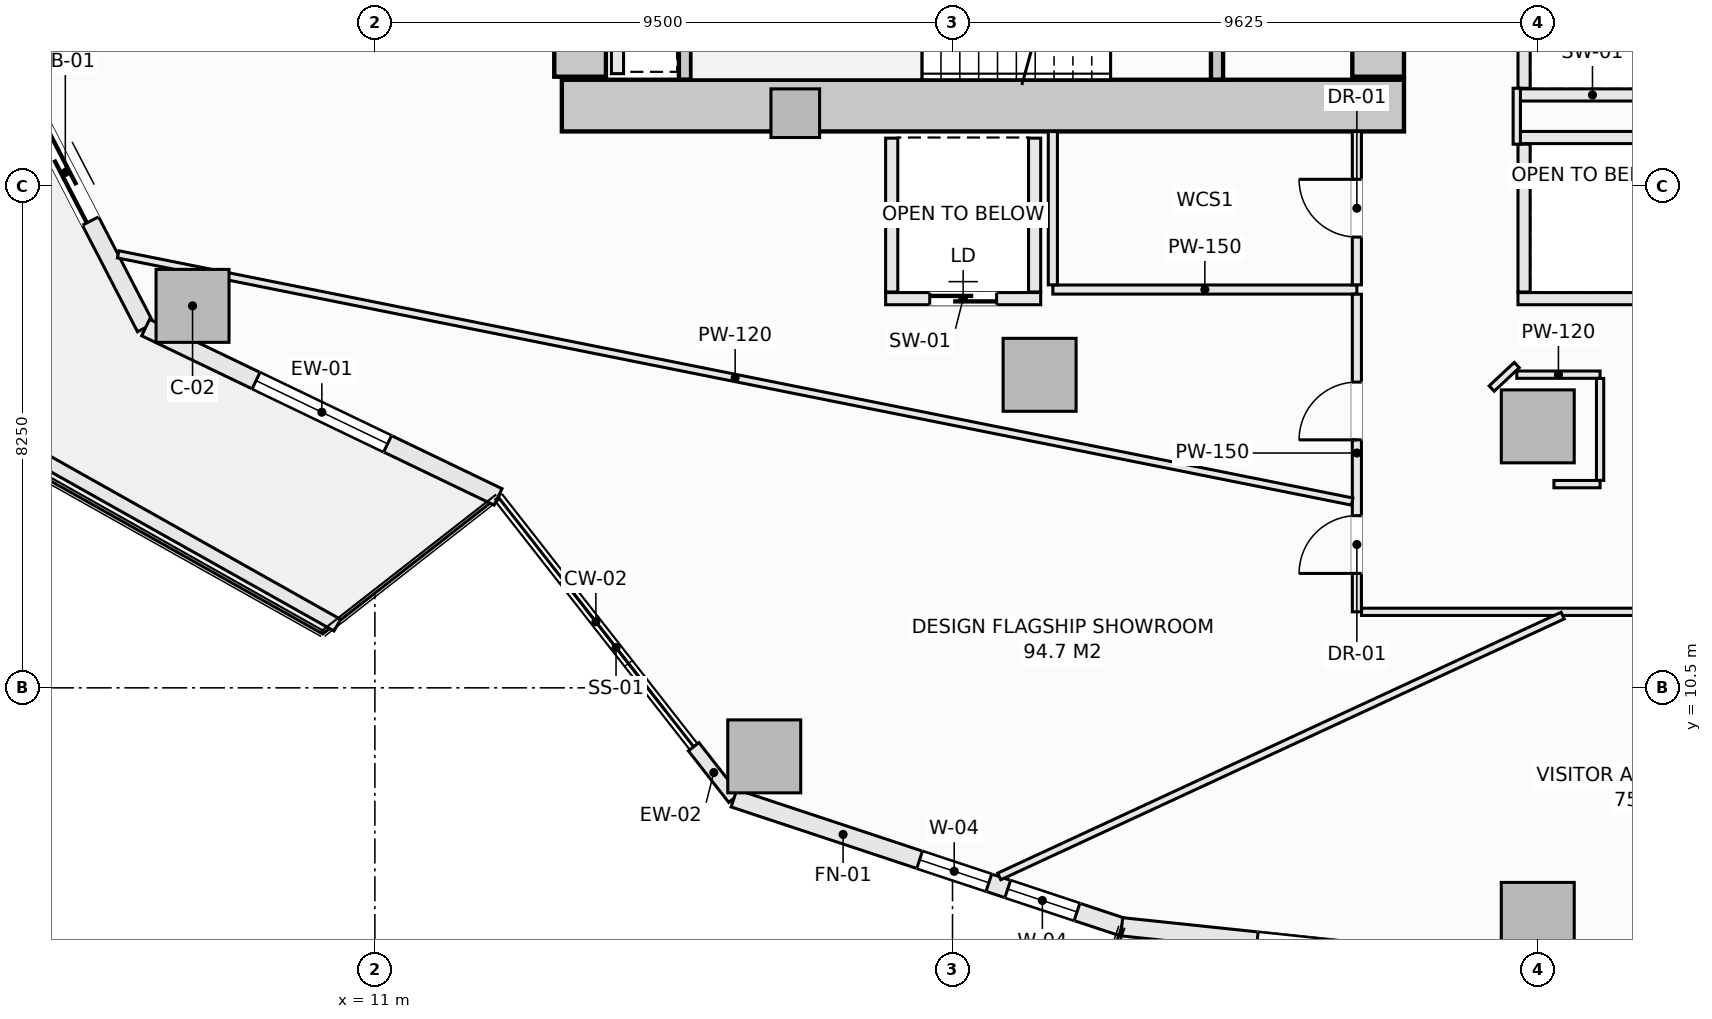
"""IFC4 building model, lengths in metres.
Left out: names, types, materials, properties, quantities, classifications, styles, units other than length and angle.
Written with IfcOpenShell. Run it as: python <this file> out.ifc"""

import sys

from ifc_helpers import new_model, si_unit, direction, frame, frame_2d, origin, origin_2d, place, context, subcontext, project, spatial, rectangle, extrude, element, fill, save


model = new_model("IFC4")
c1 = context("Model", 3, precision=1e-05, world=origin(), true_north=direction((0.0, 1.0)))
c2 = subcontext(c1, "Body", "Model", "MODEL_VIEW")
j1 = project(units=[si_unit("LENGTHUNIT", "METRE"), si_unit("PLANEANGLEUNIT", "RADIAN")], contexts=[c1])
p1 = place(None, origin())
s1 = spatial("IfcSite", under=j1, at=p1, CompositionType="ELEMENT")
p2 = place(p1, origin())
s2 = spatial("IfcBuilding", under=s1, at=p2, CompositionType="ELEMENT")
p3 = place(p2, frame((0.0, 0.0, 61.15)))
s3 = spatial("IfcBuildingStorey", under=s2, at=p3, CompositionType="ELEMENT", Elevation=61.15)
p4 = place(p3, frame((14.075, 20.075, -0.28), z_axis=(0.0, 0.0, 1.0), x_axis=(1.0, 0.0, 0.0)))
e1 = element("IfcWall", 1, at=p4, inside=s3, PredefinedType="SHEAR", context=c2, shape_type="SweptSolid", body=[
    extrude(rectangle(XDim=13.85, YDim=0.85, at=frame_2d((6.925, 0.0))), origin(), (0.0, 0.0, 1.0), 3.85),
])
p5 = place(p3, frame((14.375, 20.55, -0.28), z_axis=(0.0, 0.0, 1.0), x_axis=(0.0, 1.0, 0.0)))
e2 = element("IfcWall", 2, at=p5, inside=s3, PredefinedType="SHEAR", context=c2, shape_type="SweptSolid", body=[
    extrude(rectangle(XDim=12.9, YDim=0.85, at=frame_2d((6.45, 0.0))), origin(), (0.0, 0.0, 1.0), 3.85),
])
p6 = place(p3, frame((27.5, 20.55, -0.28), z_axis=(0.0, 0.0, 1.0), x_axis=(0.0, 1.0, 0.0)))
e3 = element("IfcWall", 3, at=p6, inside=s3, PredefinedType="SHEAR", context=c2, shape_type="SweptSolid", body=[
    extrude(rectangle(XDim=1.5, YDim=0.85, at=frame_2d((0.75, 0.0))), origin(), (0.0, 0.0, 1.0), 3.85),
])
for number, where, z_axis, x_axis in (
    (4, (8.001, 16.781, -0.28), (0.0, 0.0, 1.0), (1.0, 0.0, 0.0)),
    (5, (17.404, 9.373, -0.28), (0.0, 0.0, 1.0), (1.0, 0.0, 0.0)),
    (6, (30.125, 6.7, -0.28), (0.0, 0.0, 1.0), (1.0, 0.0, 0.0)),
    (7, (21.932, 15.648, -0.28), (0.0, 0.0, 1.0), (1.0, 0.0, 0.0)),
    (8, (30.125, 14.8, -0.28), (0.0, 0.0, 1.0), (1.0, 0.0, 0.0)),
):
    element("IfcColumn", number, at=place(p3, frame(where, z_axis=z_axis, x_axis=x_axis)), inside=s3, PredefinedType="COLUMN", context=c2, shape_type="SweptSolid", body=[
        extrude(rectangle(XDim=1.2, YDim=1.2, at=origin_2d()), origin(), (0.0, 0.0, 1.0), 3.85),
    ])
p7 = place(p3, frame((17.914, 19.95, -0.28), z_axis=(0.0, 0.0, 1.0), x_axis=(1.0, 0.0, 0.0)))
e9 = element("IfcColumn", 9, at=p7, inside=s3, PredefinedType="PILASTER", context=c2, shape_type="SweptSolid", body=[
    extrude(rectangle(XDim=0.8, YDim=0.8, at=origin_2d()), origin(), (0.0, 0.0, 1.0), 3.85),
])
p8 = place(p3, frame((4.588, 21.526, 0.0), z_axis=(0.0, 0.0, 1.0), x_axis=(0.459800981414, -0.888021991558, 0.0)))
e10 = element("IfcWall", 10, at=p8, inside=s3, PredefinedType="SOLIDWALL", context=c2, shape_type="SweptSolid", body=[
    extrude(rectangle(XDim=5.744, YDim=0.3, at=frame_2d((2.872, 0.0))), origin(), (0.0, 0.0, 1.0), 3.093),
])
p9 = place(p8, frame((1.972, 0.0, 0.0)))
e11 = element("IfcOpeningElement", 11, at=p9, cuts=e10, PredefinedType="OPENING", context=c2, shape_type="SweptSolid", body=[
    extrude(rectangle(XDim=1.8, YDim=2.25, at=frame_2d((0.9, 1.125))), frame((0.0, 0.16, 0.0), z_axis=(0.0, -1.0, 0.0), x_axis=(1.0, 0.0, 0.0)), (0.0, 0.0, 1.0), 0.32),
])
p10 = place(p3, frame((7.229, 16.425, 0.0), z_axis=(0.0, 0.0, 1.0), x_axis=(0.901354747727, -0.433081538224, 0.0)))
e12 = element("IfcWall", 12, at=p10, inside=s3, PredefinedType="SOLIDWALL", context=c2, shape_type="SweptSolid", body=[
    extrude(rectangle(XDim=6.431, YDim=0.3, at=frame_2d((3.215, 0.0))), origin(), (0.0, 0.0, 1.0), 3.093),
])
p11 = place(p10, frame((2.015, 0.0, 0.85)))
e13 = element("IfcOpeningElement", 13, at=p11, cuts=e12, PredefinedType="OPENING", context=c2, shape_type="SweptSolid", body=[
    extrude(rectangle(XDim=2.4, YDim=1.9, at=frame_2d((1.2, 0.95))), frame((0.0, 0.16, 0.0), z_axis=(0.0, -1.0, 0.0), x_axis=(1.0, 0.0, 0.0)), (0.0, 0.0, 1.0), 0.32),
])
p12 = place(p3, frame((16.243, 9.531, 0.0), z_axis=(0.0, 0.0, 1.0), x_axis=(0.616418327775, -0.787418849903, 0.0)))
e14 = element("IfcWall", 14, at=p12, inside=s3, PredefinedType="SOLIDWALL", context=c2, shape_type="SweptSolid", body=[
    extrude(rectangle(XDim=1.076, YDim=0.22, at=frame_2d((0.538, 0.0))), origin(), (0.0, 0.0, 1.0), 3.093),
])
p13 = place(p3, frame((16.906, 8.684, 0.0), z_axis=(0.0, 0.0, 1.0), x_axis=(0.949245153629, -0.314537181127, 0.0)))
e15 = element("IfcWall", 15, at=p13, inside=s3, PredefinedType="SOLIDWALL", context=c2, shape_type="SweptSolid", body=[
    extrude(rectangle(XDim=6.717, YDim=0.3, at=frame_2d((3.358, 0.0))), origin(), (0.0, 0.0, 1.0), 3.093),
])
p14 = place(p13, frame((3.215, 0.0, 0.85)))
e16 = element("IfcOpeningElement", 16, at=p14, cuts=e15, PredefinedType="OPENING", context=c2, shape_type="SweptSolid", body=[
    extrude(rectangle(XDim=1.2, YDim=1.9, at=frame_2d((0.6, 0.95))), frame((0.0, 0.16, 0.0), z_axis=(0.0, -1.0, 0.0), x_axis=(1.0, 0.0, 0.0)), (0.0, 0.0, 1.0), 0.32),
])
p15 = place(p13, frame((4.742, 0.0, 0.85)))
e17 = element("IfcOpeningElement", 17, at=p15, cuts=e15, PredefinedType="OPENING", context=c2, shape_type="SweptSolid", body=[
    extrude(rectangle(XDim=1.2, YDim=1.9, at=frame_2d((0.6, 0.95))), frame((0.0, 0.16, 0.0), z_axis=(0.0, -1.0, 0.0), x_axis=(1.0, 0.0, 0.0)), (0.0, 0.0, 1.0), 0.32),
])
p16 = place(p3, frame((23.282, 6.571, 0.0), z_axis=(0.0, 0.0, 1.0), x_axis=(0.994498840295, -0.104747585419, 0.0)))
e18 = element("IfcWall", 18, at=p16, inside=s3, PredefinedType="SOLIDWALL", context=c2, shape_type="SweptSolid", body=[
    extrude(rectangle(XDim=6.88, YDim=0.3, at=frame_2d((3.44, 0.0))), origin(), (0.0, 0.0, 1.0), 3.093),
])
p17 = place(p16, frame((2.24, 0.0, 0.85)))
e19 = element("IfcOpeningElement", 19, at=p17, cuts=e18, PredefinedType="OPENING", context=c2, shape_type="SweptSolid", body=[
    extrude(rectangle(XDim=2.4, YDim=1.9, at=frame_2d((1.2, 0.95))), frame((0.0, 0.16, 0.0), z_axis=(0.0, -1.0, 0.0), x_axis=(1.0, 0.0, 0.0)), (0.0, 0.0, 1.0), 0.32),
])
p18 = place(p3, frame((30.125, 5.85, 0.0), z_axis=(0.0, 0.0, 1.0), x_axis=(0.994498840295, 0.104747585419, 0.0)))
e20 = element("IfcWall", 20, at=p18, inside=s3, PredefinedType="SOLIDWALL", context=c2, shape_type="SweptSolid", body=[
    extrude(rectangle(XDim=6.88, YDim=0.3, at=frame_2d((3.44, 0.0))), origin(), (0.0, 0.0, 1.0), 3.093),
])
p19 = place(p18, frame((2.54, 0.0, 0.0)))
e21 = element("IfcOpeningElement", 21, at=p19, cuts=e20, PredefinedType="OPENING", context=c2, shape_type="SweptSolid", body=[
    extrude(rectangle(XDim=1.8, YDim=2.25, at=frame_2d((0.9, 1.125))), frame((0.0, 0.16, 0.0), z_axis=(0.0, -1.0, 0.0), x_axis=(1.0, 0.0, 0.0)), (0.0, 0.0, 1.0), 0.32),
])
p20 = place(p3, frame((4.147, 15.034, 0.0), z_axis=(0.0, 0.0, 1.0), x_axis=(0.871775109335, -0.489906275468, 0.0)))
e22 = element("IfcWall", 22, at=p20, inside=s3, PredefinedType="PARAPET", context=c2, shape_type="SweptSolid", body=[
    extrude(rectangle(XDim=7.152, YDim=0.22, at=frame_2d((3.576, 0.0))), origin(), (0.0, 0.0, 1.0), 0.52),
])
p21 = place(p3, frame((24.85, 20.502, -0.28), z_axis=(0.0, 0.0, 1.0), x_axis=(0.0, 1.0, 0.0)))
e23 = element("IfcWall", 23, at=p21, inside=s3, PredefinedType="SHEAR", context=c2, shape_type="SweptSolid", body=[
    extrude(rectangle(XDim=3.038, YDim=0.2, at=frame_2d((1.519, 0.0))), origin(), (0.0, 0.0, 1.0), 3.85),
])
p22 = place(p21, frame((0.969, 0.0, 0.28)))
e24 = element("IfcOpeningElement", 24, at=p22, cuts=e23, PredefinedType="OPENING", context=c2, shape_type="SweptSolid", body=[
    extrude(rectangle(XDim=1.1, YDim=2.15, at=frame_2d((0.55, 1.075))), frame((0.0, 0.11, 0.0), z_axis=(0.0, -1.0, 0.0), x_axis=(1.0, 0.0, 0.0)), (0.0, 0.0, 1.0), 0.22),
])
p23 = place(p3, frame((16.1, 20.502, -0.28), z_axis=(0.0, 0.0, 1.0), x_axis=(0.0, 1.0, 0.0)))
e25 = element("IfcWall", 25, at=p23, inside=s3, PredefinedType="SHEAR", context=c2, shape_type="SweptSolid", body=[
    extrude(rectangle(XDim=3.036, YDim=0.2, at=frame_2d((1.518, 0.0))), origin(), (0.0, 0.0, 1.0), 3.85),
])
p24 = place(p3, frame((19.4, 16.9, 0.0), z_axis=(0.0, 0.0, 1.0), x_axis=(1.0, 0.0, 0.0)))
e26 = element("IfcWall", 26, at=p24, inside=s3, PredefinedType="SOLIDWALL", context=c2, shape_type="SweptSolid", body=[
    extrude(rectangle(XDim=2.55, YDim=0.2, at=frame_2d((1.275, 0.0))), origin(), (0.0, 0.0, 1.0), 3.57),
])
p25 = place(p24, frame((0.725, 0.0, 0.0)))
e27 = element("IfcOpeningElement", 27, at=p25, cuts=e26, PredefinedType="OPENING", context=c2, shape_type="SweptSolid", body=[
    extrude(rectangle(XDim=1.1, YDim=2.2, at=frame_2d((0.55, 1.1))), frame((0.0, 0.11, 0.0), z_axis=(0.0, -1.0, 0.0), x_axis=(1.0, 0.0, 0.0)), (0.0, 0.0, 1.0), 0.22),
])
for number, where, z_axis, x_axis in (
    (28, (19.5, 17.01, 0.0), (0.0, 0.0, 1.0), (0.0, 1.0, 0.0)),
    (29, (21.85, 17.01, 0.0), (0.0, 0.0, 1.0), (0.0, 1.0, 0.0)),
):
    element("IfcWall", number, at=place(p3, frame(where, z_axis=z_axis, x_axis=x_axis)), inside=s3, PredefinedType="SOLIDWALL", context=c2, shape_type="SweptSolid", body=[
        extrude(rectangle(XDim=2.53, YDim=0.2, at=frame_2d((1.265, 0.0))), origin(), (0.0, 0.0, 1.0), 3.57),
    ])
for number, where, z_axis, x_axis in (
    (30, (29.8, 19.55, 0.0), (0.0, 0.0, 1.0), (1.0, 0.0, 0.0)),
    (31, (29.8, 16.9, 0.0), (0.0, 0.0, 1.0), (1.0, 0.0, 0.0)),
):
    element("IfcWall", number, at=place(p3, frame(where, z_axis=z_axis, x_axis=x_axis)), inside=s3, PredefinedType="SOLIDWALL", context=c2, shape_type="SweptSolid", body=[
        extrude(rectangle(XDim=2.45, YDim=0.2, at=frame_2d((1.225, 0.0))), origin(), (0.0, 0.0, 1.0), 3.57),
    ])
p26 = place(p3, frame((29.9, 17.01, 0.0), z_axis=(0.0, 0.0, 1.0), x_axis=(0.0, 1.0, 0.0)))
e32 = element("IfcWall", 32, at=p26, inside=s3, PredefinedType="SOLIDWALL", context=c2, shape_type="SweptSolid", body=[
    extrude(rectangle(XDim=2.43, YDim=0.2, at=frame_2d((1.215, 0.0))), origin(), (0.0, 0.0, 1.0), 3.57),
])
p27 = place(p3, frame((29.8, 20.25, 0.0), z_axis=(0.0, 0.0, 1.0), x_axis=(1.0, 0.0, 0.0)))
e33 = element("IfcWall", 33, at=p27, inside=s3, PredefinedType="SOLIDWALL", context=c2, shape_type="SweptSolid", body=[
    extrude(rectangle(XDim=2.45, YDim=0.2, at=frame_2d((1.225, 0.0))), origin(), (0.0, 0.0, 1.0), 3.57),
])
p28 = place(p3, frame((29.9, 20.36, 0.0), z_axis=(0.0, 0.0, 1.0), x_axis=(0.0, 1.0, 0.0)))
e34 = element("IfcWall", 34, at=p28, inside=s3, PredefinedType="SOLIDWALL", context=c2, shape_type="SweptSolid", body=[
    extrude(rectangle(XDim=2.43, YDim=0.2, at=frame_2d((1.215, 0.0))), origin(), (0.0, 0.0, 1.0), 3.57),
])
p29 = place(p3, frame((14.99, 20.6, 0.0), z_axis=(0.0, 0.0, 1.0), x_axis=(0.0, 1.0, 0.0)))
e35 = element("IfcWall", 35, at=p29, inside=s3, PredefinedType="SOLIDWALL", context=c2, shape_type="SweptSolid", body=[
    extrude(rectangle(XDim=2.85, YDim=0.2, at=frame_2d((1.425, 0.0))), origin(), (0.0, 0.0, 1.0), 3.57),
])
p30 = place(p3, frame((22.15, 17.05, 0.0), z_axis=(0.0, 0.0, 1.0), x_axis=(1.0, 0.0, 0.0)))
e36 = element("IfcWall", 36, at=p30, inside=s3, PredefinedType="PARTITIONING", context=c2, shape_type="SweptSolid", body=[
    extrude(rectangle(XDim=5.0, YDim=0.15, at=frame_2d((2.5, 0.0))), origin(), (0.0, 0.0, 1.0), 3.57),
])
p31 = place(p3, frame((22.15, 17.127, 0.0), z_axis=(0.0, 0.0, 1.0), x_axis=(0.0, 1.0, 0.0)))
e37 = element("IfcWall", 37, at=p31, inside=s3, PredefinedType="PARTITIONING", context=c2, shape_type="SweptSolid", body=[
    extrude(rectangle(XDim=2.521, YDim=0.15, at=frame_2d((1.26, 0.0))), origin(), (0.0, 0.0, 1.0), 3.57),
])
p32 = place(p3, frame((27.15, 11.75, 0.0), z_axis=(0.0, 0.0, 1.0), x_axis=(0.0, 1.0, 0.0)))
e38 = element("IfcWall", 38, at=p32, inside=s3, PredefinedType="PARTITIONING", context=c2, shape_type="SweptSolid", body=[
    extrude(rectangle(XDim=5.223, YDim=0.15, at=frame_2d((2.611, 0.0))), origin(), (0.0, 0.0, 1.0), 3.57),
])
p33 = place(p32, frame((0.631, 0.0, 0.0)))
e39 = element("IfcOpeningElement", 39, at=p33, cuts=e38, PredefinedType="OPENING", context=c2, shape_type="SweptSolid", body=[
    extrude(rectangle(XDim=0.95, YDim=2.1, at=frame_2d((0.475, 1.05))), frame((0.0, 0.085, 0.0), z_axis=(0.0, -1.0, 0.0), x_axis=(1.0, 0.0, 0.0)), (0.0, 0.0, 1.0), 0.17),
])
p34 = place(p32, frame((2.828, 0.0, 0.0)))
e40 = element("IfcOpeningElement", 40, at=p34, cuts=e38, PredefinedType="OPENING", context=c2, shape_type="SweptSolid", body=[
    extrude(rectangle(XDim=0.95, YDim=2.1, at=frame_2d((0.475, 1.05))), frame((0.0, 0.085, 0.0), z_axis=(0.0, -1.0, 0.0), x_axis=(1.0, 0.0, 0.0)), (0.0, 0.0, 1.0), 0.17),
])
p35 = place(p3, frame((27.15, 17.127, 0.0), z_axis=(0.0, 0.0, 1.0), x_axis=(0.0, 1.0, 0.0)))
e41 = element("IfcWall", 41, at=p35, inside=s3, PredefinedType="PARTITIONING", context=c2, shape_type="SweptSolid", body=[
    extrude(rectangle(XDim=2.521, YDim=0.15, at=frame_2d((1.26, 0.0))), origin(), (0.0, 0.0, 1.0), 3.57),
])
p36 = place(p35, frame((0.785, 0.0, 0.0)))
e42 = element("IfcOpeningElement", 42, at=p36, cuts=e41, PredefinedType="OPENING", context=c2, shape_type="SweptSolid", body=[
    extrude(rectangle(XDim=0.95, YDim=2.1, at=frame_2d((0.475, 1.05))), frame((0.0, 0.085, 0.0), z_axis=(0.0, -1.0, 0.0), x_axis=(1.0, 0.0, 0.0)), (0.0, 0.0, 1.0), 0.17),
])
p37 = place(p3, frame((29.78, 15.65, 0.0), z_axis=(0.0, 0.0, 1.0), x_axis=(1.0, 0.0, 0.0)))
e43 = element("IfcWall", 43, at=p37, inside=s3, PredefinedType="PARTITIONING", context=c2, shape_type="SweptSolid", body=[
    extrude(rectangle(XDim=1.37, YDim=0.12, at=frame_2d((0.685, 0.0))), origin(), (0.0, 0.0, 1.0), 3.57),
])
p38 = place(p3, frame((27.227, 11.75, 0.0), z_axis=(0.0, 0.0, 1.0), x_axis=(1.0, 0.0, 0.0)))
e44 = element("IfcWall", 44, at=p38, inside=s3, PredefinedType="PARTITIONING", context=c2, shape_type="SweptSolid", body=[
    extrude(rectangle(XDim=8.661, YDim=0.12, at=frame_2d((4.331, 0.0))), origin(), (0.0, 0.0, 1.0), 3.57),
])
p39 = place(p38, frame((5.206, 0.0, 0.0)))
e45 = element("IfcOpeningElement", 45, at=p39, cuts=e44, PredefinedType="OPENING", context=c2, shape_type="SweptSolid", body=[
    extrude(rectangle(XDim=0.95, YDim=2.1, at=frame_2d((0.475, 1.05))), frame((0.0, 0.07, 0.0), z_axis=(0.0, -1.0, 0.0), x_axis=(1.0, 0.0, 0.0)), (0.0, 0.0, 1.0), 0.14),
])
p40 = place(p3, frame((29.78, 19.44, 0.0), z_axis=(0.0, 0.0, 1.0), x_axis=(0.0, 1.0, 0.0)))
e46 = element("IfcWall", 46, at=p40, inside=s3, PredefinedType="PARTITIONING", context=c2, shape_type="SweptSolid", body=[
    extrude(rectangle(XDim=0.92, YDim=0.12, at=frame_2d((0.46, 0.0))), origin(), (0.0, 0.0, 1.0), 3.57),
])
p41 = place(p3, frame((29.367, 15.422, 0.0), z_axis=(0.0, 0.0, 1.0), x_axis=(0.730667420492, 0.682733564893, 0.0)))
e47 = element("IfcWall", 47, at=p41, inside=s3, PredefinedType="PARTITIONING", context=c2, shape_type="SweptSolid", body=[
    extrude(rectangle(XDim=0.565, YDim=0.12, at=frame_2d((0.283, 0.0))), origin(), (0.0, 0.0, 1.0), 3.57),
])
p42 = place(p3, frame((30.391, 13.85, 0.0), z_axis=(0.0, 0.0, 1.0), x_axis=(1.0, 0.0, 0.0)))
e48 = element("IfcWall", 48, at=p42, inside=s3, PredefinedType="PARTITIONING", context=c2, shape_type="SweptSolid", body=[
    extrude(rectangle(XDim=0.759, YDim=0.12, at=frame_2d((0.379, 0.0))), origin(), (0.0, 0.0, 1.0), 3.57),
])
p43 = place(p3, frame((31.15, 13.912, 0.0), z_axis=(0.0, 0.0, 1.0), x_axis=(0.0, 1.0, 0.0)))
e49 = element("IfcWall", 49, at=p43, inside=s3, PredefinedType="PARTITIONING", context=c2, shape_type="SweptSolid", body=[
    extrude(rectangle(XDim=1.676, YDim=0.12, at=frame_2d((0.838, 0.0))), origin(), (0.0, 0.0, 1.0), 3.57),
])
p44 = place(p3, frame((6.777, 17.629, 0.0), z_axis=(0.0, 0.0, 1.0), x_axis=(0.980522111168, -0.19640873074, 0.0)))
e50 = element("IfcWall", 50, at=p44, inside=s3, PredefinedType="PARTITIONING", context=c2, shape_type="SweptSolid", body=[
    extrude(rectangle(XDim=20.699, YDim=0.12, at=frame_2d((10.349, 0.0))), origin(), (0.0, 0.0, 1.0), 3.205),
])
p45 = place(p3, frame((21.269, 7.398, 0.0), z_axis=(0.0, 0.0, 1.0), x_axis=(0.907478047532, 0.420099503983, 0.0)))
e51 = element("IfcWall", 51, at=p45, inside=s3, PredefinedType="PARTITIONING", context=c2, shape_type="SweptSolid", body=[
    extrude(rectangle(XDim=10.211, YDim=0.12, at=frame_2d((5.106, 0.0))), origin(), (0.0, 0.0, 1.0), 3.093),
])
p46 = place(p9, frame((1.8, 0.0, 0.0), z_axis=(0.0, 0.0, 1.0), x_axis=(-1.0, 0.0, 0.0)))
e52 = element("IfcDoor", 52, at=p46, inside=s3, OperationType="SLIDING_TO_LEFT", PredefinedType="DOOR", context=c2, shape_type="SweptSolid", body=[
    extrude(rectangle(XDim=1.8, YDim=2.25, at=frame_2d((0.9, 1.125))), frame((0.0, 0.025, 0.0), z_axis=(0.0, -1.0, 0.0), x_axis=(1.0, 0.0, 0.0)), (0.0, 0.0, 1.0), 0.05),
])
fill(e11, e52)
p47 = place(p11, origin())
e53 = element("IfcWindow", 53, at=p47, inside=s3, PartitioningType="SINGLE_PANEL", PredefinedType="WINDOW", context=c2, shape_type="SweptSolid", body=[
    extrude(rectangle(XDim=2.4, YDim=1.9, at=frame_2d((1.2, 0.95))), frame((0.0, 0.03, 0.0), z_axis=(0.0, -1.0, 0.0), x_axis=(1.0, 0.0, 0.0)), (0.0, 0.0, 1.0), 0.06),
])
fill(e13, e53)
p48 = place(p14, origin())
e54 = element("IfcWindow", 54, at=p48, inside=s3, PartitioningType="SINGLE_PANEL", PredefinedType="WINDOW", context=c2, shape_type="SweptSolid", body=[
    extrude(rectangle(XDim=1.2, YDim=1.9, at=frame_2d((0.6, 0.95))), frame((0.0, 0.03, 0.0), z_axis=(0.0, -1.0, 0.0), x_axis=(1.0, 0.0, 0.0)), (0.0, 0.0, 1.0), 0.06),
])
fill(e16, e54)
p49 = place(p17, origin())
e55 = element("IfcWindow", 55, at=p49, inside=s3, PartitioningType="SINGLE_PANEL", PredefinedType="WINDOW", context=c2, shape_type="SweptSolid", body=[
    extrude(rectangle(XDim=2.4, YDim=1.9, at=frame_2d((1.2, 0.95))), frame((0.0, 0.03, 0.0), z_axis=(0.0, -1.0, 0.0), x_axis=(1.0, 0.0, 0.0)), (0.0, 0.0, 1.0), 0.06),
])
fill(e19, e55)
p50 = place(p25, origin())
e56 = element("IfcDoor", 56, at=p50, inside=s3, OperationType="SLIDING_TO_LEFT", PredefinedType="DOOR", context=c2, shape_type="SweptSolid", body=[
    extrude(rectangle(XDim=1.1, YDim=2.2, at=frame_2d((0.55, 1.1))), frame((0.0, 0.025, 0.0), z_axis=(0.0, -1.0, 0.0), x_axis=(1.0, 0.0, 0.0)), (0.0, 0.0, 1.0), 0.05),
])
fill(e27, e56)
p51 = place(p36, origin())
e57 = element("IfcDoor", 57, at=p51, inside=s3, OperationType="SINGLE_SWING_RIGHT", PredefinedType="DOOR", context=c2, shape_type="SweptSolid", body=[
    extrude(rectangle(XDim=0.95, YDim=2.1, at=frame_2d((0.475, 1.05))), frame((0.0, 0.025, 0.0), z_axis=(0.0, -1.0, 0.0), x_axis=(1.0, 0.0, 0.0)), (0.0, 0.0, 1.0), 0.05),
])
fill(e42, e57)
p52 = place(p33, origin())
e58 = element("IfcDoor", 58, at=p52, inside=s3, OperationType="SINGLE_SWING_LEFT", PredefinedType="DOOR", context=c2, shape_type="SweptSolid", body=[
    extrude(rectangle(XDim=0.95, YDim=2.1, at=frame_2d((0.475, 1.05))), frame((0.0, 0.025, 0.0), z_axis=(0.0, -1.0, 0.0), x_axis=(1.0, 0.0, 0.0)), (0.0, 0.0, 1.0), 0.05),
])
fill(e39, e58)
p53 = place(p34, origin())
e59 = element("IfcDoor", 59, at=p53, inside=s3, OperationType="SINGLE_SWING_LEFT", PredefinedType="DOOR", context=c2, shape_type="SweptSolid", body=[
    extrude(rectangle(XDim=0.95, YDim=2.1, at=frame_2d((0.475, 1.05))), frame((0.0, 0.025, 0.0), z_axis=(0.0, -1.0, 0.0), x_axis=(1.0, 0.0, 0.0)), (0.0, 0.0, 1.0), 0.05),
])
fill(e40, e59)
p54 = place(p15, origin())
e60 = element("IfcWindow", 60, at=p54, inside=s3, PartitioningType="SINGLE_PANEL", PredefinedType="WINDOW", context=c2, shape_type="SweptSolid", body=[
    extrude(rectangle(XDim=1.2, YDim=1.9, at=frame_2d((0.6, 0.95))), frame((0.0, 0.03, 0.0), z_axis=(0.0, -1.0, 0.0), x_axis=(1.0, 0.0, 0.0)), (0.0, 0.0, 1.0), 0.06),
])
fill(e17, e60)
save(model, sys.argv[1])
